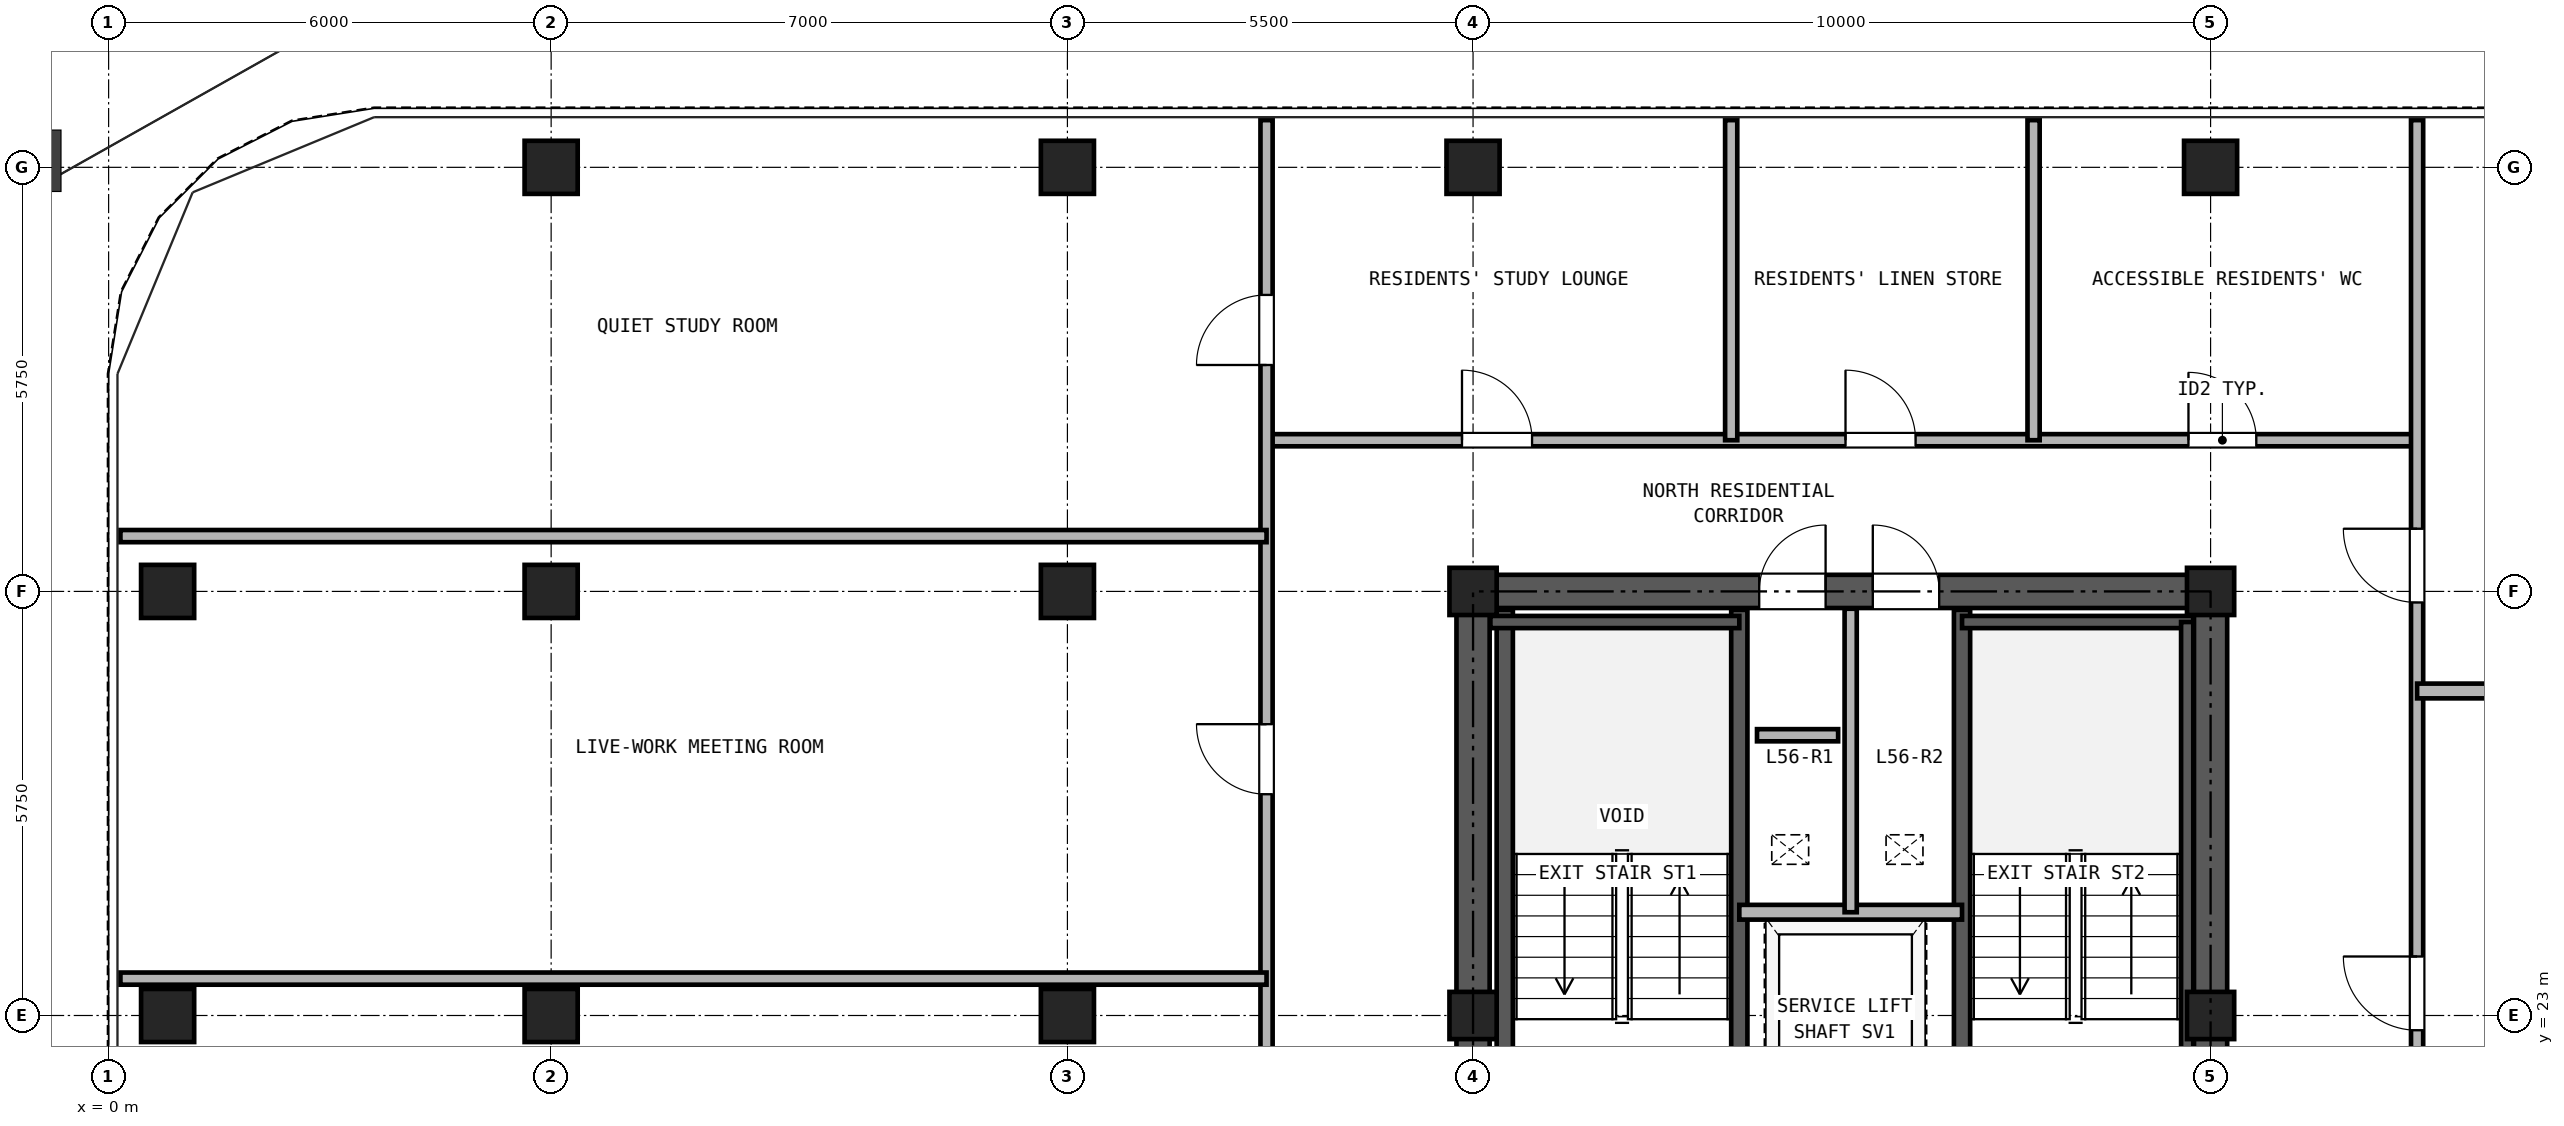
"""IFC4 building model, lengths in metres.
Left out: names, types, materials, properties, quantities, classifications, styles, units other than length and angle.
Written with IfcOpenShell. Run it as: python <this file> out.ifc"""

import sys

from ifc_helpers import new_model, si_unit, direction, frame, frame_2d, origin, origin_2d, place, context, subcontext, project, spatial, rectangle, hollow_rectangle, extrude, source, transform, mapped, element, fill, save


model = new_model("IFC4")
c1 = context("Model", 3, precision=1e-05, world=origin(), true_north=direction((0.0, 1.0)))
c2 = subcontext(c1, "Body", "Model", "MODEL_VIEW")
j1 = project(units=[si_unit("LENGTHUNIT", "METRE"), si_unit("PLANEANGLEUNIT", "RADIAN")], contexts=[c1])
p1 = place(None, origin())
s1 = spatial("IfcSite", under=j1, at=p1, CompositionType="ELEMENT")
p2 = place(p1, origin())
s2 = spatial("IfcBuilding", under=s1, at=p2, CompositionType="ELEMENT")
p3 = place(p2, frame((0.0, 0.0, 199.6)))
s3 = spatial("IfcBuildingStorey", under=s2, at=p3, CompositionType="ELEMENT", Elevation=199.6)
m1 = source(origin(), c2, "Body", "SweptSolid", [
    extrude(hollow_rectangle(XDim=0.72, YDim=0.72, WallThickness=0.04, at=origin_2d()), origin(), (0.0, 0.0, 1.0), 2.95),
])
for number, where, z_axis, x_axis in (
    (1, (6.0, 34.5, 0.0), (0.0, 0.0, 1.0), (1.0, 0.0, 0.0)),
    (2, (13.0, 34.5, 0.0), (0.0, 0.0, 1.0), (1.0, 0.0, 0.0)),
    (3, (18.5, 34.5, 0.0), (0.0, 0.0, 1.0), (1.0, 0.0, 0.0)),
    (4, (28.5, 34.5, 0.0), (0.0, 0.0, 1.0), (1.0, 0.0, 0.0)),
    (5, (0.8, 23.0, 0.0), (0.0, 0.0, 1.0), (1.0, 0.0, 0.0)),
    (6, (0.8, 28.75, 0.0), (0.0, 0.0, 1.0), (1.0, 0.0, 0.0)),
    (7, (6.0, 23.0, 0.0), (0.0, 0.0, 1.0), (1.0, 0.0, 0.0)),
    (8, (6.0, 28.75, 0.0), (0.0, 0.0, 1.0), (1.0, 0.0, 0.0)),
    (9, (13.0, 23.0, 0.0), (0.0, 0.0, 1.0), (1.0, 0.0, 0.0)),
    (10, (13.0, 28.75, 0.0), (0.0, 0.0, 1.0), (1.0, 0.0, 0.0)),
):
    element("IfcColumn", number, at=place(p3, frame(where, z_axis=z_axis, x_axis=x_axis)), inside=s3, PredefinedType="COLUMN", context=c2, shape_type="MappedRepresentation", body=[
        mapped(m1, transform((0.0, 0.0, 0.0), x_axis=(1.0, 0.0, 0.0), y_axis=(0.0, 1.0, 0.0), z_axis=(0.0, 0.0, 1.0), scale=1.0)),
    ])
m2 = source(origin(), c2, "Body", "SweptSolid", [
    extrude(hollow_rectangle(XDim=0.64, YDim=0.64, WallThickness=0.035, at=origin_2d()), origin(), (0.0, 0.0, 1.0), 2.95),
])
for number, where, z_axis, x_axis in (
    (11, (18.5, 23.0, 0.0), (0.0, 0.0, 1.0), (1.0, 0.0, 0.0)),
    (12, (18.5, 28.75, 0.0), (0.0, 0.0, 1.0), (1.0, 0.0, 0.0)),
    (13, (28.5, 23.0, 0.0), (0.0, 0.0, 1.0), (1.0, 0.0, 0.0)),
    (14, (28.5, 28.75, 0.0), (0.0, 0.0, 1.0), (1.0, 0.0, 0.0)),
):
    element("IfcColumn", number, at=place(p3, frame(where, z_axis=z_axis, x_axis=x_axis)), inside=s3, PredefinedType="COLUMN", context=c2, shape_type="MappedRepresentation", body=[
        mapped(m2, transform((0.0, 0.0, 0.0), x_axis=(1.0, 0.0, 0.0), y_axis=(0.0, 1.0, 0.0), z_axis=(0.0, 0.0, 1.0), scale=1.0)),
    ])
p4 = place(p3, frame((18.275, 28.75, 0.0), z_axis=(0.0, 0.0, 1.0), x_axis=(1.0, 0.0, 0.0)))
e15 = element("IfcWall", 15, at=p4, inside=s3, PredefinedType="SHEAR", context=c2, shape_type="SweptSolid", body=[
    extrude(rectangle(XDim=10.45, YDim=0.45, at=frame_2d((5.225, 0.0))), origin(), (0.0, 0.0, 1.0), 2.95),
])
p5 = place(p4, frame((4.105, 0.0, 0.0)))
e16 = element("IfcOpeningElement", 16, at=p5, cuts=e15, PredefinedType="OPENING", context=c2, shape_type="SweptSolid", body=[
    extrude(rectangle(XDim=0.9, YDim=2.05, at=frame_2d((0.45, 1.025))), frame((0.0, 0.235, 0.0), z_axis=(0.0, -1.0, 0.0), x_axis=(1.0, 0.0, 0.0)), (0.0, 0.0, 1.0), 0.47),
])
p6 = place(p4, frame((5.645, 0.0, 0.0)))
e17 = element("IfcOpeningElement", 17, at=p6, cuts=e15, PredefinedType="OPENING", context=c2, shape_type="SweptSolid", body=[
    extrude(rectangle(XDim=0.9, YDim=2.05, at=frame_2d((0.45, 1.025))), frame((0.0, 0.235, 0.0), z_axis=(0.0, -1.0, 0.0), x_axis=(1.0, 0.0, 0.0)), (0.0, 0.0, 1.0), 0.47),
])
p7 = place(p3, frame((18.5, 11.725, 0.0), z_axis=(0.0, 0.0, 1.0), x_axis=(0.0, 1.0, 0.0)))
e18 = element("IfcWall", 18, at=p7, inside=s3, PredefinedType="SHEAR", context=c2, shape_type="SweptSolid", body=[
    extrude(rectangle(XDim=16.8, YDim=0.45, at=frame_2d((8.4, 0.0))), origin(), (0.0, 0.0, 1.0), 2.95),
])
p8 = place(p7, frame((7.425, 0.0, 0.0)))
e19 = element("IfcOpeningElement", 19, at=p8, cuts=e18, PredefinedType="OPENING", context=c2, shape_type="SweptSolid", body=[
    extrude(rectangle(XDim=1.15, YDim=2.2, at=frame_2d((0.575, 1.1))), frame((0.0, 0.235, 0.0), z_axis=(0.0, -1.0, 0.0), x_axis=(1.0, 0.0, 0.0)), (0.0, 0.0, 1.0), 0.47),
])
p9 = place(p3, frame((28.5, 11.725, 0.0), z_axis=(0.0, 0.0, 1.0), x_axis=(0.0, 1.0, 0.0)))
e20 = element("IfcWall", 20, at=p9, inside=s3, PredefinedType="SHEAR", context=c2, shape_type="SweptSolid", body=[
    extrude(rectangle(XDim=16.8, YDim=0.45, at=frame_2d((8.4, 0.0))), origin(), (0.0, 0.0, 1.0), 2.95),
])
p10 = place(p9, frame((7.425, 0.0, 0.0)))
e21 = element("IfcOpeningElement", 21, at=p10, cuts=e20, PredefinedType="OPENING", context=c2, shape_type="SweptSolid", body=[
    extrude(rectangle(XDim=1.15, YDim=2.2, at=frame_2d((0.575, 1.1))), frame((0.0, 0.235, 0.0), z_axis=(0.0, -1.0, 0.0), x_axis=(1.0, 0.0, 0.0)), (0.0, 0.0, 1.0), 0.47),
])
for number, where, z_axis, x_axis in (
    (22, (18.93, 21.39, 0.0), (0.0, 0.0, 1.0), (0.0, 1.0, 0.0)),
    (23, (22.11, 21.39, 0.0), (0.0, 0.0, 1.0), (0.0, 1.0, 0.0)),
    (24, (25.13, 21.39, 0.0), (0.0, 0.0, 1.0), (0.0, 1.0, 0.0)),
):
    element("IfcWall", number, at=place(p3, frame(where, z_axis=z_axis, x_axis=x_axis)), inside=s3, PredefinedType="SOLIDWALL", context=c2, shape_type="SweptSolid", body=[
        extrude(rectangle(XDim=7.11, YDim=0.22, at=frame_2d((3.555, 0.0))), origin(), (0.0, 0.0, 1.0), 2.95),
    ])
p11 = place(p3, frame((18.735, 28.335, 0.0), z_axis=(0.0, 0.0, 1.0), x_axis=(1.0, 0.0, 0.0)))
e25 = element("IfcWall", 25, at=p11, inside=s3, PredefinedType="PARTITIONING", context=c2, shape_type="SweptSolid", body=[
    extrude(rectangle(XDim=3.375, YDim=0.165, at=frame_2d((1.688, 0.0))), origin(), (0.0, 0.0, 1.0), 2.95),
])
p12 = place(p3, frame((25.13, 28.335, 0.0), z_axis=(0.0, 0.0, 1.0), x_axis=(1.0, 0.0, 0.0)))
e26 = element("IfcWall", 26, at=p12, inside=s3, PredefinedType="PARTITIONING", context=c2, shape_type="SweptSolid", body=[
    extrude(rectangle(XDim=3.135, YDim=0.165, at=frame_2d((1.567, 0.0))), origin(), (0.0, 0.0, 1.0), 2.95),
])
p13 = place(p3, frame((28.183, 21.39, 0.0), z_axis=(0.0, 0.0, 1.0), x_axis=(0.0, 1.0, 0.0)))
e27 = element("IfcWall", 27, at=p13, inside=s3, PredefinedType="PARTITIONING", context=c2, shape_type="SweptSolid", body=[
    extrude(rectangle(XDim=6.945, YDim=0.165, at=frame_2d((3.473, 0.0))), origin(), (0.0, 0.0, 1.0), 2.95),
])
p14 = place(p3, frame((22.11, 24.4, 0.0), z_axis=(0.0, 0.0, 1.0), x_axis=(1.0, 0.0, 0.0)))
e28 = element("IfcWall", 28, at=p14, inside=s3, PredefinedType="PARTITIONING", context=c2, shape_type="SweptSolid", body=[
    extrude(rectangle(XDim=3.02, YDim=0.2, at=frame_2d((1.51, 0.0))), origin(), (0.0, 0.0, 1.0), 2.95),
])
p15 = place(p3, frame((23.62, 24.4, 0.0), z_axis=(0.0, 0.0, 1.0), x_axis=(0.0, 1.0, 0.0)))
e29 = element("IfcWall", 29, at=p15, inside=s3, PredefinedType="PARTITIONING", context=c2, shape_type="SweptSolid", body=[
    extrude(rectangle(XDim=4.115, YDim=0.165, at=frame_2d((2.058, 0.0))), origin(), (0.0, 0.0, 1.0), 2.95),
])
p16 = place(p3, frame((15.7, 30.8, 0.0), z_axis=(0.0, 0.0, 1.0), x_axis=(1.0, 0.0, 0.0)))
e30 = element("IfcWall", 30, at=p16, inside=s3, PredefinedType="PARTITIONING", context=c2, shape_type="SweptSolid", body=[
    extrude(rectangle(XDim=15.6, YDim=0.165, at=frame_2d((7.8, 0.0))), origin(), (0.0, 0.0, 1.0), 2.95),
])
p17 = place(p16, frame((2.65, 0.0, 0.0)))
e31 = element("IfcOpeningElement", 31, at=p17, cuts=e30, PredefinedType="OPENING", context=c2, shape_type="SweptSolid", body=[
    extrude(rectangle(XDim=0.95, YDim=2.15, at=frame_2d((0.475, 1.075))), frame((0.0, 0.093, 0.0), z_axis=(0.0, -1.0, 0.0), x_axis=(1.0, 0.0, 0.0)), (0.0, 0.0, 1.0), 0.185),
])
p18 = place(p16, frame((7.85, 0.0, 0.0)))
e32 = element("IfcOpeningElement", 32, at=p18, cuts=e30, PredefinedType="OPENING", context=c2, shape_type="SweptSolid", body=[
    extrude(rectangle(XDim=0.95, YDim=2.15, at=frame_2d((0.475, 1.075))), frame((0.0, 0.093, 0.0), z_axis=(0.0, -1.0, 0.0), x_axis=(1.0, 0.0, 0.0)), (0.0, 0.0, 1.0), 0.185),
])
p19 = place(p16, frame((12.5, 0.0, 0.0)))
e33 = element("IfcOpeningElement", 33, at=p19, cuts=e30, PredefinedType="OPENING", context=c2, shape_type="SweptSolid", body=[
    extrude(rectangle(XDim=0.92, YDim=2.1, at=frame_2d((0.46, 1.05))), frame((0.0, 0.093, 0.0), z_axis=(0.0, -1.0, 0.0), x_axis=(1.0, 0.0, 0.0)), (0.0, 0.0, 1.0), 0.185),
])
p20 = place(p3, frame((15.7, 10.85, 0.0), z_axis=(0.0, 0.0, 1.0), x_axis=(0.0, 1.0, 0.0)))
e34 = element("IfcWall", 34, at=p20, inside=s3, PredefinedType="PARTITIONING", context=c2, shape_type="SweptSolid", body=[
    extrude(rectangle(XDim=24.29, YDim=0.165, at=frame_2d((12.145, 0.0))), origin(), (0.0, 0.0, 1.0), 2.95),
])
p21 = place(p20, frame((2.825, 0.0, 0.0)))
e35 = element("IfcOpeningElement", 35, at=p21, cuts=e34, PredefinedType="OPENING", context=c2, shape_type="SweptSolid", body=[
    extrude(rectangle(XDim=0.95, YDim=2.15, at=frame_2d((0.475, 1.075))), frame((0.0, 0.093, 0.0), z_axis=(0.0, -1.0, 0.0), x_axis=(1.0, 0.0, 0.0)), (0.0, 0.0, 1.0), 0.185),
])
p22 = place(p20, frame((9.15, 0.0, 0.0)))
e36 = element("IfcOpeningElement", 36, at=p22, cuts=e34, PredefinedType="OPENING", context=c2, shape_type="SweptSolid", body=[
    extrude(rectangle(XDim=0.95, YDim=2.15, at=frame_2d((0.475, 1.075))), frame((0.0, 0.093, 0.0), z_axis=(0.0, -1.0, 0.0), x_axis=(1.0, 0.0, 0.0)), (0.0, 0.0, 1.0), 0.185),
])
p23 = place(p20, frame((15.15, 0.0, 0.0)))
e37 = element("IfcOpeningElement", 37, at=p23, cuts=e34, PredefinedType="OPENING", context=c2, shape_type="SweptSolid", body=[
    extrude(rectangle(XDim=0.95, YDim=2.15, at=frame_2d((0.475, 1.075))), frame((0.0, 0.093, 0.0), z_axis=(0.0, -1.0, 0.0), x_axis=(1.0, 0.0, 0.0)), (0.0, 0.0, 1.0), 0.185),
])
p24 = place(p20, frame((20.97, 0.0, 0.0)))
e38 = element("IfcOpeningElement", 38, at=p24, cuts=e34, PredefinedType="OPENING", context=c2, shape_type="SweptSolid", body=[
    extrude(rectangle(XDim=0.95, YDim=2.15, at=frame_2d((0.475, 1.075))), frame((0.0, 0.093, 0.0), z_axis=(0.0, -1.0, 0.0), x_axis=(1.0, 0.0, 0.0)), (0.0, 0.0, 1.0), 0.185),
])
p25 = place(p3, frame((31.3, 10.85, 0.0), z_axis=(0.0, 0.0, 1.0), x_axis=(0.0, 1.0, 0.0)))
e39 = element("IfcWall", 39, at=p25, inside=s3, PredefinedType="PARTITIONING", context=c2, shape_type="SweptSolid", body=[
    extrude(rectangle(XDim=24.29, YDim=0.165, at=frame_2d((12.145, 0.0))), origin(), (0.0, 0.0, 1.0), 2.95),
])
p26 = place(p25, frame((3.675, 0.0, 0.0)))
e40 = element("IfcOpeningElement", 40, at=p26, cuts=e39, PredefinedType="OPENING", context=c2, shape_type="SweptSolid", body=[
    extrude(rectangle(XDim=1.0, YDim=2.15, at=frame_2d((0.5, 1.075))), frame((0.0, 0.093, 0.0), z_axis=(0.0, -1.0, 0.0), x_axis=(1.0, 0.0, 0.0)), (0.0, 0.0, 1.0), 0.185),
])
p27 = place(p25, frame((11.95, 0.0, 0.0)))
e41 = element("IfcOpeningElement", 41, at=p27, cuts=e39, PredefinedType="OPENING", context=c2, shape_type="SweptSolid", body=[
    extrude(rectangle(XDim=1.0, YDim=2.15, at=frame_2d((0.5, 1.075))), frame((0.0, 0.093, 0.0), z_axis=(0.0, -1.0, 0.0), x_axis=(1.0, 0.0, 0.0)), (0.0, 0.0, 1.0), 0.185),
])
p28 = place(p25, frame((17.75, 0.0, 0.0)))
e42 = element("IfcOpeningElement", 42, at=p28, cuts=e39, PredefinedType="OPENING", context=c2, shape_type="SweptSolid", body=[
    extrude(rectangle(XDim=1.0, YDim=2.15, at=frame_2d((0.5, 1.075))), frame((0.0, 0.093, 0.0), z_axis=(0.0, -1.0, 0.0), x_axis=(1.0, 0.0, 0.0)), (0.0, 0.0, 1.0), 0.185),
])
for number, where, z_axis, x_axis in (
    (43, (0.16, 23.5, 0.0), (0.0, 0.0, 1.0), (1.0, 0.0, 0.0)),
    (44, (0.16, 29.5, 0.0), (0.0, 0.0, 1.0), (1.0, 0.0, 0.0)),
):
    element("IfcWall", number, at=place(p3, frame(where, z_axis=z_axis, x_axis=x_axis)), inside=s3, PredefinedType="PARTITIONING", context=c2, shape_type="SweptSolid", body=[
        extrude(rectangle(XDim=15.54, YDim=0.165, at=frame_2d((7.77, 0.0))), origin(), (0.0, 0.0, 1.0), 2.95),
    ])
p29 = place(p3, frame((31.3, 27.4, 0.0), z_axis=(0.0, 0.0, 1.0), x_axis=(1.0, 0.0, 0.0)))
e45 = element("IfcWall", 45, at=p29, inside=s3, PredefinedType="PARTITIONING", context=c2, shape_type="SweptSolid", body=[
    extrude(rectangle(XDim=10.34, YDim=0.2, at=frame_2d((5.17, 0.0))), origin(), (0.0, 0.0, 1.0), 2.95),
])
for number, where, z_axis, x_axis in (
    (46, (22.0, 30.8, 0.0), (0.0, 0.0, 1.0), (0.0, 1.0, 0.0)),
    (47, (26.1, 30.8, 0.0), (0.0, 0.0, 1.0), (0.0, 1.0, 0.0)),
):
    element("IfcWall", number, at=place(p3, frame(where, z_axis=z_axis, x_axis=x_axis)), inside=s3, PredefinedType="PARTITIONING", context=c2, shape_type="SweptSolid", body=[
        extrude(rectangle(XDim=4.34, YDim=0.165, at=frame_2d((2.17, 0.0))), origin(), (0.0, 0.0, 1.0), 2.95),
    ])
p30 = place(p3, frame((22.35, 26.8, 0.0), z_axis=(0.0, 0.0, 1.0), x_axis=(1.0, 0.0, 0.0)))
e48 = element("IfcWall", 48, at=p30, inside=s3, PredefinedType="PARTITIONING", context=c2, shape_type="SweptSolid", body=[
    extrude(rectangle(XDim=1.1, YDim=0.165, at=frame_2d((0.55, 0.0))), origin(), (0.0, 0.0, 1.0), 2.95),
])
p31 = place(p5, origin())
e49 = element("IfcDoor", 49, at=p31, inside=s3, OperationType="SINGLE_SWING_RIGHT", PredefinedType="DOOR", context=c2, shape_type="SweptSolid", body=[
    extrude(rectangle(XDim=0.9, YDim=2.05, at=frame_2d((0.45, 1.025))), frame((0.0, 0.025, 0.0), z_axis=(0.0, -1.0, 0.0), x_axis=(1.0, 0.0, 0.0)), (0.0, 0.0, 1.0), 0.05),
])
fill(e16, e49)
p32 = place(p6, origin())
e50 = element("IfcDoor", 50, at=p32, inside=s3, OperationType="SINGLE_SWING_LEFT", PredefinedType="DOOR", context=c2, shape_type="SweptSolid", body=[
    extrude(rectangle(XDim=0.9, YDim=2.05, at=frame_2d((0.45, 1.025))), frame((0.0, 0.025, 0.0), z_axis=(0.0, -1.0, 0.0), x_axis=(1.0, 0.0, 0.0)), (0.0, 0.0, 1.0), 0.05),
])
fill(e17, e50)
p33 = place(p23, frame((0.95, 0.0, 0.0), z_axis=(0.0, 0.0, 1.0), x_axis=(-1.0, 0.0, 0.0)))
e51 = element("IfcDoor", 51, at=p33, inside=s3, OperationType="SINGLE_SWING_RIGHT", PredefinedType="DOOR", context=c2, shape_type="SweptSolid", body=[
    extrude(rectangle(XDim=0.95, YDim=2.15, at=frame_2d((0.475, 1.075))), frame((0.0, 0.025, 0.0), z_axis=(0.0, -1.0, 0.0), x_axis=(1.0, 0.0, 0.0)), (0.0, 0.0, 1.0), 0.05),
])
fill(e37, e51)
p34 = place(p24, frame((0.95, 0.0, 0.0), z_axis=(0.0, 0.0, 1.0), x_axis=(-1.0, 0.0, 0.0)))
e52 = element("IfcDoor", 52, at=p34, inside=s3, OperationType="SINGLE_SWING_LEFT", PredefinedType="DOOR", context=c2, shape_type="SweptSolid", body=[
    extrude(rectangle(XDim=0.95, YDim=2.15, at=frame_2d((0.475, 1.075))), frame((0.0, 0.025, 0.0), z_axis=(0.0, -1.0, 0.0), x_axis=(1.0, 0.0, 0.0)), (0.0, 0.0, 1.0), 0.05),
])
fill(e38, e52)
p35 = place(p27, frame((1.0, 0.0, 0.0), z_axis=(0.0, 0.0, 1.0), x_axis=(-1.0, 0.0, 0.0)))
e53 = element("IfcDoor", 53, at=p35, inside=s3, OperationType="SINGLE_SWING_RIGHT", PredefinedType="DOOR", context=c2, shape_type="SweptSolid", body=[
    extrude(rectangle(XDim=1.0, YDim=2.15, at=frame_2d((0.5, 1.075))), frame((0.0, 0.025, 0.0), z_axis=(0.0, -1.0, 0.0), x_axis=(1.0, 0.0, 0.0)), (0.0, 0.0, 1.0), 0.05),
])
fill(e41, e53)
p36 = place(p28, frame((1.0, 0.0, 0.0), z_axis=(0.0, 0.0, 1.0), x_axis=(-1.0, 0.0, 0.0)))
e54 = element("IfcDoor", 54, at=p36, inside=s3, OperationType="SINGLE_SWING_RIGHT", PredefinedType="DOOR", context=c2, shape_type="SweptSolid", body=[
    extrude(rectangle(XDim=1.0, YDim=2.15, at=frame_2d((0.5, 1.075))), frame((0.0, 0.025, 0.0), z_axis=(0.0, -1.0, 0.0), x_axis=(1.0, 0.0, 0.0)), (0.0, 0.0, 1.0), 0.05),
])
fill(e42, e54)
p37 = place(p17, origin())
e55 = element("IfcDoor", 55, at=p37, inside=s3, OperationType="SINGLE_SWING_LEFT", PredefinedType="DOOR", context=c2, shape_type="SweptSolid", body=[
    extrude(rectangle(XDim=0.95, YDim=2.15, at=frame_2d((0.475, 1.075))), frame((0.0, 0.025, 0.0), z_axis=(0.0, -1.0, 0.0), x_axis=(1.0, 0.0, 0.0)), (0.0, 0.0, 1.0), 0.05),
])
fill(e31, e55)
p38 = place(p18, origin())
e56 = element("IfcDoor", 56, at=p38, inside=s3, OperationType="SINGLE_SWING_LEFT", PredefinedType="DOOR", context=c2, shape_type="SweptSolid", body=[
    extrude(rectangle(XDim=0.95, YDim=2.15, at=frame_2d((0.475, 1.075))), frame((0.0, 0.025, 0.0), z_axis=(0.0, -1.0, 0.0), x_axis=(1.0, 0.0, 0.0)), (0.0, 0.0, 1.0), 0.05),
])
fill(e32, e56)
p39 = place(p19, origin())
e57 = element("IfcDoor", 57, at=p39, inside=s3, OperationType="SINGLE_SWING_LEFT", PredefinedType="DOOR", context=c2, shape_type="SweptSolid", body=[
    extrude(rectangle(XDim=0.92, YDim=2.1, at=frame_2d((0.46, 1.05))), frame((0.0, 0.025, 0.0), z_axis=(0.0, -1.0, 0.0), x_axis=(1.0, 0.0, 0.0)), (0.0, 0.0, 1.0), 0.05),
])
fill(e33, e57)
save(model, sys.argv[1])
